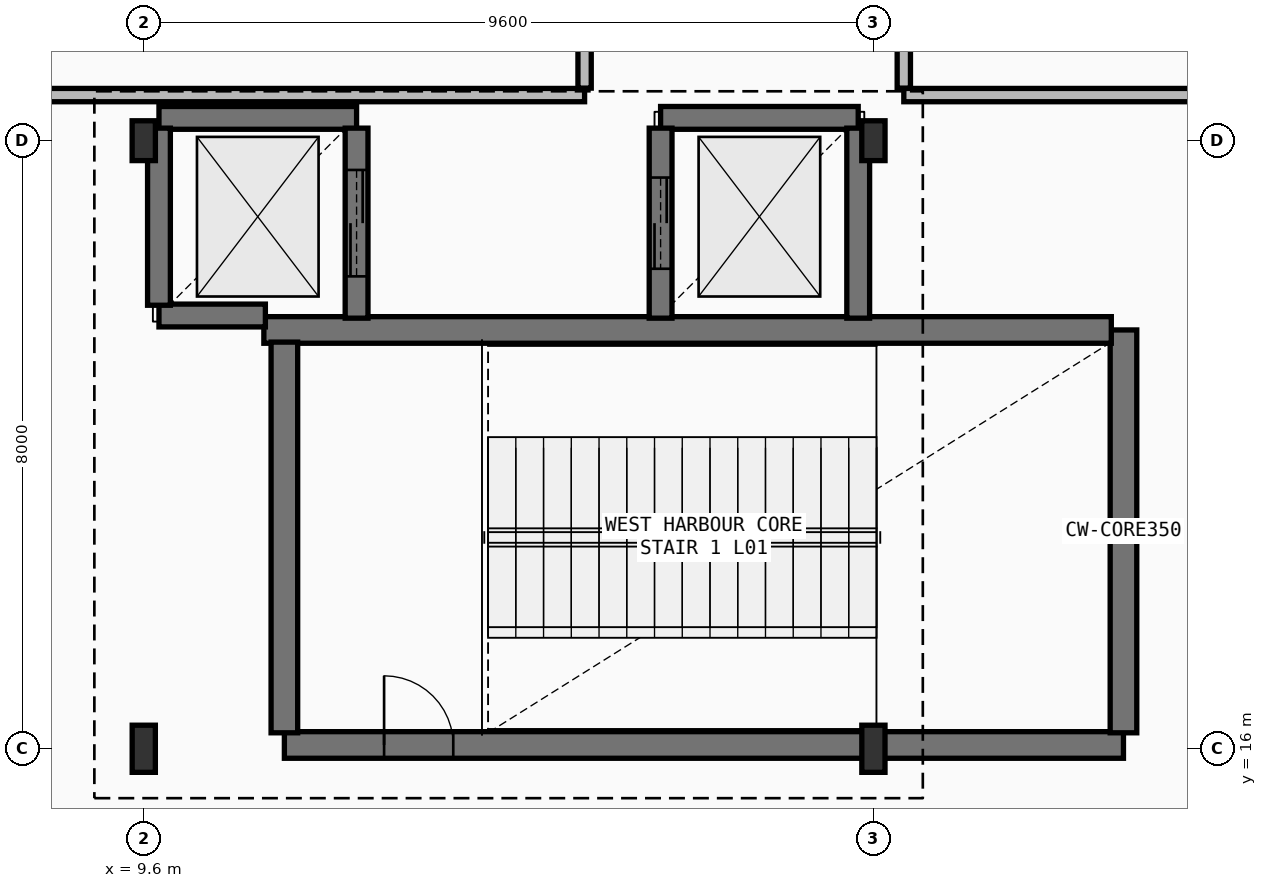
"""IFC4 building model, lengths in metres.
Left out: names, types, materials, properties, quantities, classifications, styles, units other than length and angle.
Written with IfcOpenShell. Run it as: python <this file> out.ifc"""

import sys

from ifc_helpers import new_model, si_unit, direction, frame, frame_2d, origin, origin_2d, place, context, subcontext, project, spatial, rectangle, i_section, extrude, element, fill, save


model = new_model("IFC4")
c1 = context("Model", 3, precision=1e-05, world=origin(), true_north=direction((0.0, 1.0)))
c2 = subcontext(c1, "Body", "Model", "MODEL_VIEW")
j1 = project(units=[si_unit("LENGTHUNIT", "METRE"), si_unit("PLANEANGLEUNIT", "RADIAN")], contexts=[c1])
p1 = place(None, origin())
s1 = spatial("IfcSite", under=j1, at=p1, CompositionType="ELEMENT")
p2 = place(p1, origin())
s2 = spatial("IfcBuilding", under=s1, at=p2, CompositionType="ELEMENT")
p3 = place(p2, frame((0.0, 0.0, 6.0)))
s3 = spatial("IfcBuildingStorey", under=s2, at=p3, CompositionType="ELEMENT", Elevation=6.0)
p4 = place(p3, frame((9.6, 16.0, 0.0), z_axis=(0.0, 0.0, 1.0), x_axis=(1.0, 0.0, 0.0)))
e1 = element("IfcColumn", 1, at=p4, inside=s3, PredefinedType="COLUMN", context=c2, shape_type="SweptSolid", body=[
    extrude(i_section(OverallWidth=0.305, OverallDepth=0.62, WebThickness=0.021, FlangeThickness=0.04, FilletRadius=0.027, at=origin_2d()), origin(), (0.0, 0.0, 1.0), 5.4),
])
p5 = place(p3, frame((9.6, 24.0, 0.0), z_axis=(0.0, 0.0, 1.0), x_axis=(1.0, 0.0, 0.0)))
e2 = element("IfcColumn", 2, at=p5, inside=s3, PredefinedType="COLUMN", context=c2, shape_type="SweptSolid", body=[
    extrude(i_section(OverallWidth=0.306, OverallDepth=0.524, WebThickness=0.021, FlangeThickness=0.04, FilletRadius=0.027, at=origin_2d()), origin(), (0.0, 0.0, 1.0), 5.4),
])
p6 = place(p3, frame((19.2, 16.0, 0.0), z_axis=(0.0, 0.0, 1.0), x_axis=(1.0, 0.0, 0.0)))
e3 = element("IfcColumn", 3, at=p6, inside=s3, PredefinedType="COLUMN", context=c2, shape_type="SweptSolid", body=[
    extrude(i_section(OverallWidth=0.305, OverallDepth=0.62, WebThickness=0.021, FlangeThickness=0.04, FilletRadius=0.027, at=origin_2d()), origin(), (0.0, 0.0, 1.0), 5.4),
])
p7 = place(p3, frame((19.2, 24.0, 0.0), z_axis=(0.0, 0.0, 1.0), x_axis=(1.0, 0.0, 0.0)))
e4 = element("IfcColumn", 4, at=p7, inside=s3, PredefinedType="COLUMN", context=c2, shape_type="SweptSolid", body=[
    extrude(i_section(OverallWidth=0.306, OverallDepth=0.524, WebThickness=0.021, FlangeThickness=0.04, FilletRadius=0.027, at=origin_2d()), origin(), (0.0, 0.0, 1.0), 5.4),
])
p8 = place(p3, frame((11.45, 16.05, 0.0), z_axis=(0.0, 0.0, 1.0), x_axis=(1.0, 0.0, 0.0)))
e5 = element("IfcWall", 5, at=p8, inside=s3, PredefinedType="SHEAR", context=c2, shape_type="SweptSolid", body=[
    extrude(rectangle(XDim=11.04, YDim=0.35, at=frame_2d((5.52, 0.0))), origin(), (0.0, 0.0, 1.0), 5.15),
])
p9 = place(p8, frame((1.312, 0.0, 0.0)))
e6 = element("IfcOpeningElement", 6, at=p9, cuts=e5, PredefinedType="OPENING", context=c2, shape_type="SweptSolid", body=[
    extrude(rectangle(XDim=0.91, YDim=2.08, at=frame_2d((0.455, 1.04))), frame((0.0, 0.185, 0.0), z_axis=(0.0, -1.0, 0.0), x_axis=(1.0, 0.0, 0.0)), (0.0, 0.0, 1.0), 0.37),
])
p10 = place(p3, frame((22.49, 16.21, 0.0), z_axis=(0.0, 0.0, 1.0), x_axis=(0.0, 1.0, 0.0)))
e7 = element("IfcWall", 7, at=p10, inside=s3, PredefinedType="SHEAR", context=c2, shape_type="SweptSolid", body=[
    extrude(rectangle(XDim=5.3, YDim=0.35, at=frame_2d((2.65, 0.0))), origin(), (0.0, 0.0, 1.0), 5.15),
])
p11 = place(p3, frame((22.33, 21.51, 0.0), z_axis=(0.0, 0.0, 1.0), x_axis=(-1.0, 0.0, 0.0)))
e8 = element("IfcWall", 8, at=p11, inside=s3, PredefinedType="SHEAR", context=c2, shape_type="SweptSolid", body=[
    extrude(rectangle(XDim=11.15, YDim=0.35, at=frame_2d((5.575, 0.0))), origin(), (0.0, 0.0, 1.0), 5.15),
])
p12 = place(p3, frame((11.45, 21.35, 0.0), z_axis=(0.0, 0.0, 1.0), x_axis=(0.0, -1.0, 0.0)))
e9 = element("IfcWall", 9, at=p12, inside=s3, PredefinedType="SHEAR", context=c2, shape_type="SweptSolid", body=[
    extrude(rectangle(XDim=5.14, YDim=0.35, at=frame_2d((2.57, 0.0))), origin(), (0.0, 0.0, 1.0), 5.15),
])
p13 = place(p3, frame((12.4, 24.3, 0.0), z_axis=(0.0, 0.0, 1.0), x_axis=(-1.0, 0.0, 0.0)))
e10 = element("IfcWall", 10, at=p13, inside=s3, PredefinedType="SHEAR", context=c2, shape_type="SweptSolid", body=[
    extrude(rectangle(XDim=2.6, YDim=0.3, at=frame_2d((1.3, 0.0))), origin(), (0.0, 0.0, 1.0), 5.15),
])
p14 = place(p3, frame((9.8, 21.7, 0.0), z_axis=(0.0, 0.0, 1.0), x_axis=(1.0, 0.0, 0.0)))
e11 = element("IfcWall", 11, at=p14, inside=s3, PredefinedType="SHEAR", context=c2, shape_type="SweptSolid", body=[
    extrude(rectangle(XDim=1.4, YDim=0.3, at=frame_2d((0.7, 0.0))), origin(), (0.0, 0.0, 1.0), 5.15),
])
p15 = place(p3, frame((12.4, 21.665, 0.0), z_axis=(0.0, 0.0, 1.0), x_axis=(0.0, 1.0, 0.0)))
e12 = element("IfcWall", 12, at=p15, inside=s3, PredefinedType="SHEAR", context=c2, shape_type="SweptSolid", body=[
    extrude(rectangle(XDim=2.5, YDim=0.3, at=frame_2d((1.25, 0.0))), origin(), (0.0, 0.0, 1.0), 5.15),
])
p16 = place(p15, frame((0.55, 0.0, 0.0)))
e13 = element("IfcOpeningElement", 13, at=p16, cuts=e12, PredefinedType="OPENING", context=c2, shape_type="SweptSolid", body=[
    extrude(rectangle(XDim=1.4, YDim=2.26, at=frame_2d((0.7, 1.13))), frame((0.0, 0.16, 0.0), z_axis=(0.0, -1.0, 0.0), x_axis=(1.0, 0.0, 0.0)), (0.0, 0.0, 1.0), 0.32),
])
p17 = place(p3, frame((9.8, 24.165, 0.0), z_axis=(0.0, 0.0, 1.0), x_axis=(0.0, -1.0, 0.0)))
e14 = element("IfcWall", 14, at=p17, inside=s3, PredefinedType="SHEAR", context=c2, shape_type="SweptSolid", body=[
    extrude(rectangle(XDim=2.33, YDim=0.3, at=frame_2d((1.165, 0.0))), origin(), (0.0, 0.0, 1.0), 5.15),
])
p18 = place(p3, frame((19.0, 24.3, 0.0), z_axis=(0.0, 0.0, 1.0), x_axis=(-1.0, 0.0, 0.0)))
e15 = element("IfcWall", 15, at=p18, inside=s3, PredefinedType="SHEAR", context=c2, shape_type="SweptSolid", body=[
    extrude(rectangle(XDim=2.6, YDim=0.3, at=frame_2d((1.3, 0.0))), origin(), (0.0, 0.0, 1.0), 5.15),
])
p19 = place(p3, frame((19.0, 21.665, 0.0), z_axis=(0.0, 0.0, 1.0), x_axis=(0.0, 1.0, 0.0)))
e16 = element("IfcWall", 16, at=p19, inside=s3, PredefinedType="SHEAR", context=c2, shape_type="SweptSolid", body=[
    extrude(rectangle(XDim=2.5, YDim=0.3, at=frame_2d((1.25, 0.0))), origin(), (0.0, 0.0, 1.0), 5.15),
])
p20 = place(p3, frame((16.4, 24.165, 0.0), z_axis=(0.0, 0.0, 1.0), x_axis=(0.0, -1.0, 0.0)))
e17 = element("IfcWall", 17, at=p20, inside=s3, PredefinedType="SHEAR", context=c2, shape_type="SweptSolid", body=[
    extrude(rectangle(XDim=2.5, YDim=0.3, at=frame_2d((1.25, 0.0))), origin(), (0.0, 0.0, 1.0), 5.15),
])
p21 = place(p20, frame((0.65, 0.0, 0.0)))
e18 = element("IfcOpeningElement", 18, at=p21, cuts=e17, PredefinedType="OPENING", context=c2, shape_type="SweptSolid", body=[
    extrude(rectangle(XDim=1.2, YDim=2.2, at=frame_2d((0.6, 1.1))), frame((0.0, 0.16, 0.0), z_axis=(0.0, -1.0, 0.0), x_axis=(1.0, 0.0, 0.0)), (0.0, 0.0, 1.0), 0.32),
])
p22 = place(p3, frame((0.6, 24.6, 0.0), z_axis=(0.0, 0.0, 1.0), x_axis=(1.0, 0.0, 0.0)))
e19 = element("IfcWall", 19, at=p22, inside=s3, PredefinedType="PARTITIONING", context=c2, shape_type="SweptSolid", body=[
    extrude(rectangle(XDim=14.8, YDim=0.175, at=frame_2d((7.4, 0.0))), origin(), (0.0, 0.0, 1.0), 4.42),
])
p23 = place(p22, frame((5.296, 0.0, 0.0)))
e20 = element("IfcOpeningElement", 20, at=p23, cuts=e19, PredefinedType="OPENING", context=c2, shape_type="SweptSolid", body=[
    extrude(rectangle(XDim=1.56, YDim=2.18, at=frame_2d((0.78, 1.09))), frame((0.0, 0.097, 0.0), z_axis=(0.0, -1.0, 0.0), x_axis=(1.0, 0.0, 0.0)), (0.0, 0.0, 1.0), 0.195),
])
p24 = place(p3, frame((15.4, 24.691, 0.0), z_axis=(0.0, 0.0, 1.0), x_axis=(0.0, 1.0, 0.0)))
e21 = element("IfcWall", 21, at=p24, inside=s3, PredefinedType="PARTITIONING", context=c2, shape_type="SweptSolid", body=[
    extrude(rectangle(XDim=14.708, YDim=0.175, at=frame_2d((7.354, 0.0))), origin(), (0.0, 0.0, 1.0), 4.73),
])
p25 = place(p3, frame((19.6, 24.6, 0.0), z_axis=(0.0, 0.0, 1.0), x_axis=(1.0, 0.0, 0.0)))
e22 = element("IfcWall", 22, at=p25, inside=s3, PredefinedType="PARTITIONING", context=c2, shape_type="SweptSolid", body=[
    extrude(rectangle(XDim=18.4, YDim=0.175, at=frame_2d((9.2, 0.0))), origin(), (0.0, 0.0, 1.0), 4.62),
])
p26 = place(p25, frame((5.866, 0.0, 0.0)))
e23 = element("IfcOpeningElement", 23, at=p26, cuts=e22, PredefinedType="OPENING", context=c2, shape_type="SweptSolid", body=[
    extrude(rectangle(XDim=1.64, YDim=2.2, at=frame_2d((0.82, 1.1))), frame((0.0, 0.097, 0.0), z_axis=(0.0, -1.0, 0.0), x_axis=(1.0, 0.0, 0.0)), (0.0, 0.0, 1.0), 0.195),
])
p27 = place(p25, frame((13.502, 0.0, 0.0)))
e24 = element("IfcOpeningElement", 24, at=p27, cuts=e22, PredefinedType="OPENING", context=c2, shape_type="SweptSolid", body=[
    extrude(rectangle(XDim=1.09, YDim=2.18, at=frame_2d((0.545, 1.09))), frame((0.0, 0.097, 0.0), z_axis=(0.0, -1.0, 0.0), x_axis=(1.0, 0.0, 0.0)), (0.0, 0.0, 1.0), 0.195),
])
p28 = place(p3, frame((19.6, 39.309, 0.0), z_axis=(0.0, 0.0, 1.0), x_axis=(0.0, -1.0, 0.0)))
e25 = element("IfcWall", 25, at=p28, inside=s3, PredefinedType="PARTITIONING", context=c2, shape_type="SweptSolid", body=[
    extrude(rectangle(XDim=14.617, YDim=0.175, at=frame_2d((7.309, 0.0))), origin(), (0.0, 0.0, 1.0), 4.52),
])
p29 = place(p9, origin())
e26 = element("IfcDoor", 26, at=p29, inside=s3, OperationType="SINGLE_SWING_LEFT", PredefinedType="DOOR", context=c2, shape_type="SweptSolid", body=[
    extrude(rectangle(XDim=0.91, YDim=2.08, at=frame_2d((0.455, 1.04))), frame((0.0, 0.025, 0.0), z_axis=(0.0, -1.0, 0.0), x_axis=(1.0, 0.0, 0.0)), (0.0, 0.0, 1.0), 0.05),
])
fill(e6, e26)
p30 = place(p16, origin())
e27 = element("IfcDoor", 27, at=p30, inside=s3, OperationType="DOUBLE_DOOR_SLIDING", PredefinedType="DOOR", context=c2, shape_type="SweptSolid", body=[
    extrude(rectangle(XDim=1.4, YDim=2.26, at=frame_2d((0.7, 1.13))), frame((0.0, 0.025, 0.0), z_axis=(0.0, -1.0, 0.0), x_axis=(1.0, 0.0, 0.0)), (0.0, 0.0, 1.0), 0.05),
])
fill(e13, e27)
p31 = place(p21, origin())
e28 = element("IfcDoor", 28, at=p31, inside=s3, OperationType="DOUBLE_DOOR_SLIDING", PredefinedType="DOOR", context=c2, shape_type="SweptSolid", body=[
    extrude(rectangle(XDim=1.2, YDim=2.2, at=frame_2d((0.6, 1.1))), frame((0.0, 0.025, 0.0), z_axis=(0.0, -1.0, 0.0), x_axis=(1.0, 0.0, 0.0)), (0.0, 0.0, 1.0), 0.05),
])
fill(e18, e28)
save(model, sys.argv[1])
